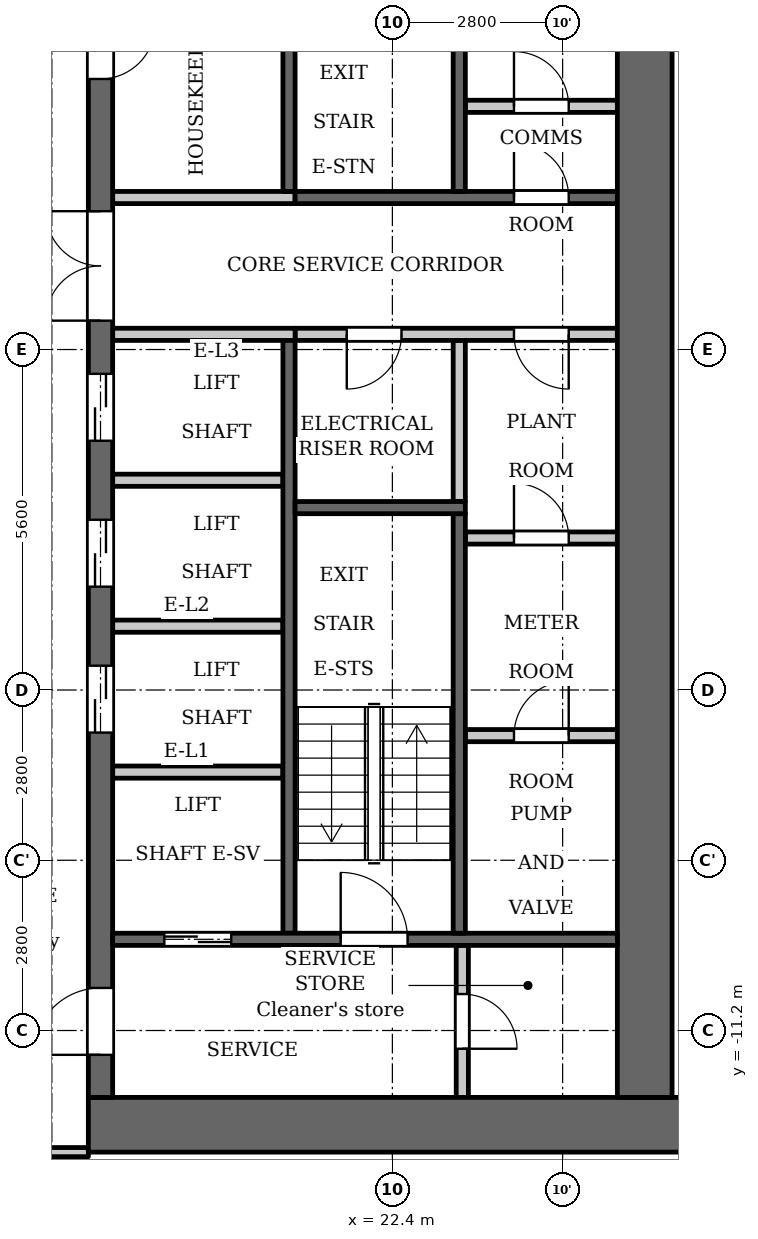
"""IFC4 building model, lengths in metres.
Left out: names, types, materials, properties, quantities, classifications, styles, units other than length and angle.
Written with IfcOpenShell. Run it as: python <this file> out.ifc"""

import sys

from ifc_helpers import new_model, si_unit, direction, frame, frame_2d, origin, place, context, subcontext, project, spatial, rectangle, extrude, element, fill, save


model = new_model("IFC4")
c1 = context("Model", 3, precision=1e-05, world=origin(), true_north=direction((0.0, 1.0)))
c2 = subcontext(c1, "Body", "Model", "MODEL_VIEW")
j1 = project(units=[si_unit("LENGTHUNIT", "METRE"), si_unit("PLANEANGLEUNIT", "RADIAN")], contexts=[c1])
p1 = place(None, origin())
s1 = spatial("IfcSite", under=j1, at=p1, CompositionType="ELEMENT")
p2 = place(p1, origin())
s2 = spatial("IfcBuilding", under=s1, at=p2, CompositionType="ELEMENT")
p3 = place(p2, frame((0.0, 0.0, 111.3)))
s3 = spatial("IfcBuildingStorey", under=s2, at=p3, CompositionType="ELEMENT", Elevation=111.3)
p4 = place(p3, frame((23.5, -2.5, 0.0), z_axis=(0.0, 0.0, 1.0), x_axis=(0.0, 1.0, 0.0)))
e1 = element("IfcWall", 1, at=p4, inside=s3, PredefinedType="PARTITIONING", context=c2, shape_type="SweptSolid", body=[
    extrude(rectangle(XDim=2.65, YDim=0.2, at=frame_2d((1.325, 0.0))), origin(), (0.0, 0.0, 1.0), 3.2),
])
p5 = place(p3, frame((20.7, 2.6, 0.0), z_axis=(0.0, 0.0, 1.0), x_axis=(0.0, 1.0, 0.0)))
e2 = element("IfcWall", 2, at=p5, inside=s3, PredefinedType="SHEAR", context=c2, shape_type="SweptSolid", body=[
    extrude(rectangle(XDim=7.0, YDim=0.2, at=frame_2d((3.5, 0.0))), origin(), (0.0, 0.0, 1.0), 3.2),
])
p6 = place(p3, frame((20.7, -9.6, 0.0), z_axis=(0.0, 0.0, 1.0), x_axis=(0.0, 1.0, 0.0)))
e3 = element("IfcWall", 3, at=p6, inside=s3, PredefinedType="SHEAR", context=c2, shape_type="SweptSolid", body=[
    extrude(rectangle(XDim=9.75, YDim=0.2, at=frame_2d((4.875, 0.0))), origin(), (0.0, 0.0, 1.0), 3.2),
])
p7 = place(p3, frame((20.8, 2.5, 0.0), z_axis=(0.0, 0.0, 1.0), x_axis=(1.0, 0.0, 0.0)))
e4 = element("IfcWall", 4, at=p7, inside=s3, PredefinedType="SHEAR", context=c2, shape_type="SweptSolid", body=[
    extrude(rectangle(XDim=5.3, YDim=0.2, at=frame_2d((2.65, 0.0))), origin(), (0.0, 0.0, 1.0), 3.2),
])
p8 = place(p7, frame((3.6, 0.0, 0.0)))
e5 = element("IfcOpeningElement", 5, at=p8, cuts=e4, PredefinedType="OPENING", context=c2, shape_type="SweptSolid", body=[
    extrude(rectangle(XDim=0.9, YDim=2.1, at=frame_2d((0.45, 1.05))), frame((0.0, 0.11, 0.0), z_axis=(0.0, -1.0, 0.0), x_axis=(1.0, 0.0, 0.0)), (0.0, 0.0, 1.0), 0.22),
])
p9 = place(p3, frame((20.8, 0.25, 0.0), z_axis=(0.0, 0.0, 1.0), x_axis=(1.0, 0.0, 0.0)))
e6 = element("IfcWall", 6, at=p9, inside=s3, PredefinedType="PARTITIONING", context=c2, shape_type="SweptSolid", body=[
    extrude(rectangle(XDim=5.3, YDim=0.2, at=frame_2d((2.65, 0.0))), origin(), (0.0, 0.0, 1.0), 3.2),
])
p10 = place(p9, frame((0.85, 0.0, 0.0)))
e7 = element("IfcOpeningElement", 7, at=p10, cuts=e6, PredefinedType="OPENING", context=c2, shape_type="SweptSolid", body=[
    extrude(rectangle(XDim=0.9, YDim=2.1, at=frame_2d((0.45, 1.05))), frame((0.0, 0.11, 0.0), z_axis=(0.0, -1.0, 0.0), x_axis=(1.0, 0.0, 0.0)), (0.0, 0.0, 1.0), 0.22),
])
p11 = place(p9, frame((3.6, 0.0, 0.0)))
e8 = element("IfcOpeningElement", 8, at=p11, cuts=e6, PredefinedType="OPENING", context=c2, shape_type="SweptSolid", body=[
    extrude(rectangle(XDim=0.9, YDim=2.1, at=frame_2d((0.45, 1.05))), frame((0.0, 0.11, 0.0), z_axis=(0.0, -1.0, 0.0), x_axis=(1.0, 0.0, 0.0)), (0.0, 0.0, 1.0), 0.22),
])
p12 = place(p3, frame((17.4, -12.75, 0.0), z_axis=(0.0, 0.0, 1.0), x_axis=(1.0, 0.0, 0.0)))
e9 = element("IfcWall", 9, at=p12, inside=s3, PredefinedType="SHEAR", context=c2, shape_type="SweptSolid", body=[
    extrude(rectangle(XDim=10.4, YDim=0.9, at=frame_2d((5.2, 0.0))), origin(), (0.0, 0.0, 1.0), 3.2),
])
p13 = place(p3, frame((17.6, -12.3, 0.0), z_axis=(0.0, 0.0, 1.0), x_axis=(0.0, 1.0, 0.0)))
e10 = element("IfcWall", 10, at=p13, inside=s3, PredefinedType="SHEAR", context=c2, shape_type="SweptSolid", body=[
    extrude(rectangle(XDim=24.6, YDim=0.4, at=frame_2d((12.3, 0.0))), origin(), (0.0, 0.0, 1.0), 3.2),
])
p14 = place(p13, frame((6.0, 0.0, 0.0)))
e11 = element("IfcOpeningElement", 11, at=p14, cuts=e10, PredefinedType="OPENING", context=c2, shape_type="SweptSolid", body=[
    extrude(rectangle(XDim=1.1, YDim=2.1, at=frame_2d((0.55, 1.05))), frame((0.0, 0.21, 0.0), z_axis=(0.0, -1.0, 0.0), x_axis=(1.0, 0.0, 0.0)), (0.0, 0.0, 1.0), 0.42),
])
p15 = place(p13, frame((8.4, 0.0, 0.0)))
e12 = element("IfcOpeningElement", 12, at=p15, cuts=e10, PredefinedType="OPENING", context=c2, shape_type="SweptSolid", body=[
    extrude(rectangle(XDim=1.1, YDim=2.1, at=frame_2d((0.55, 1.05))), frame((0.0, 0.21, 0.0), z_axis=(0.0, -1.0, 0.0), x_axis=(1.0, 0.0, 0.0)), (0.0, 0.0, 1.0), 0.42),
])
p16 = place(p13, frame((10.8, 0.0, 0.0)))
e13 = element("IfcOpeningElement", 13, at=p16, cuts=e10, PredefinedType="OPENING", context=c2, shape_type="SweptSolid", body=[
    extrude(rectangle(XDim=1.1, YDim=2.1, at=frame_2d((0.55, 1.05))), frame((0.0, 0.21, 0.0), z_axis=(0.0, -1.0, 0.0), x_axis=(1.0, 0.0, 0.0)), (0.0, 0.0, 1.0), 0.42),
])
p17 = place(p13, frame((16.75, 0.0, 0.0)))
e14 = element("IfcOpeningElement", 14, at=p17, cuts=e10, PredefinedType="OPENING", context=c2, shape_type="SweptSolid", body=[
    extrude(rectangle(XDim=0.9, YDim=2.1, at=frame_2d((0.45, 1.05))), frame((0.0, 0.21, 0.0), z_axis=(0.0, -1.0, 0.0), x_axis=(1.0, 0.0, 0.0)), (0.0, 0.0, 1.0), 0.42),
])
p18 = place(p13, frame((22.8, 0.0, 0.0)))
e15 = element("IfcOpeningElement", 15, at=p18, cuts=e10, PredefinedType="OPENING", context=c2, shape_type="SweptSolid", body=[
    extrude(rectangle(XDim=1.1, YDim=2.1, at=frame_2d((0.55, 1.05))), frame((0.0, 0.21, 0.0), z_axis=(0.0, -1.0, 0.0), x_axis=(1.0, 0.0, 0.0)), (0.0, 0.0, 1.0), 0.42),
])
p19 = place(p13, frame((0.7, 0.0, 0.0)))
e16 = element("IfcOpeningElement", 16, at=p19, cuts=e10, PredefinedType="OPENING", context=c2, shape_type="SweptSolid", body=[
    extrude(rectangle(XDim=1.1, YDim=2.1, at=frame_2d((0.55, 1.05))), frame((0.0, 0.21, 0.0), z_axis=(0.0, -1.0, 0.0), x_axis=(1.0, 0.0, 0.0)), (0.0, 0.0, 1.0), 0.42),
])
p20 = place(p13, frame((12.775, 0.0, 0.0)))
e17 = element("IfcOpeningElement", 17, at=p20, cuts=e10, PredefinedType="OPENING", context=c2, shape_type="SweptSolid", body=[
    extrude(rectangle(XDim=1.8, YDim=2.1, at=frame_2d((0.9, 1.05))), frame((0.0, 0.21, 0.0), z_axis=(0.0, -1.0, 0.0), x_axis=(1.0, 0.0, 0.0)), (0.0, 0.0, 1.0), 0.42),
])
p21 = place(p3, frame((26.55, -12.3, 0.0), z_axis=(0.0, 0.0, 1.0), x_axis=(0.0, 1.0, 0.0)))
e18 = element("IfcWall", 18, at=p21, inside=s3, PredefinedType="SHEAR", context=c2, shape_type="SweptSolid", body=[
    extrude(rectangle(XDim=24.6, YDim=0.9, at=frame_2d((12.3, 0.0))), origin(), (0.0, 0.0, 1.0), 3.2),
])
p22 = place(p3, frame((23.55, -12.3, 0.0), z_axis=(0.0, 0.0, 1.0), x_axis=(0.0, 1.0, 0.0)))
e19 = element("IfcWall", 19, at=p22, inside=s3, PredefinedType="PARTITIONING", context=c2, shape_type="SweptSolid", body=[
    extrude(rectangle(XDim=2.5, YDim=0.2, at=frame_2d((1.25, 0.0))), origin(), (0.0, 0.0, 1.0), 3.2),
])
p23 = place(p22, frame((0.8, 0.0, 0.0)))
e20 = element("IfcOpeningElement", 20, at=p23, cuts=e19, PredefinedType="OPENING", context=c2, shape_type="SweptSolid", body=[
    extrude(rectangle(XDim=0.9, YDim=2.1, at=frame_2d((0.45, 1.05))), frame((0.0, 0.11, 0.0), z_axis=(0.0, -1.0, 0.0), x_axis=(1.0, 0.0, 0.0)), (0.0, 0.0, 1.0), 0.22),
])
p24 = place(p3, frame((23.6, -6.35, 0.0), z_axis=(0.0, 0.0, 1.0), x_axis=(1.0, 0.0, 0.0)))
e21 = element("IfcWall", 21, at=p24, inside=s3, PredefinedType="PARTITIONING", context=c2, shape_type="SweptSolid", body=[
    extrude(rectangle(XDim=2.5, YDim=0.2, at=frame_2d((1.25, 0.0))), origin(), (0.0, 0.0, 1.0), 3.2),
])
p25 = place(p24, frame((0.8, 0.0, 0.0)))
e22 = element("IfcOpeningElement", 22, at=p25, cuts=e21, PredefinedType="OPENING", context=c2, shape_type="SweptSolid", body=[
    extrude(rectangle(XDim=0.9, YDim=2.1, at=frame_2d((0.45, 1.05))), frame((0.0, 0.11, 0.0), z_axis=(0.0, -1.0, 0.0), x_axis=(1.0, 0.0, 0.0)), (0.0, 0.0, 1.0), 0.22),
])
p26 = place(p3, frame((23.6, -3.1, 0.0), z_axis=(0.0, 0.0, 1.0), x_axis=(1.0, 0.0, 0.0)))
e23 = element("IfcWall", 23, at=p26, inside=s3, PredefinedType="PARTITIONING", context=c2, shape_type="SweptSolid", body=[
    extrude(rectangle(XDim=2.5, YDim=0.2, at=frame_2d((1.25, 0.0))), origin(), (0.0, 0.0, 1.0), 3.2),
])
p27 = place(p26, frame((0.8, 0.0, 0.0)))
e24 = element("IfcOpeningElement", 24, at=p27, cuts=e23, PredefinedType="OPENING", context=c2, shape_type="SweptSolid", body=[
    extrude(rectangle(XDim=0.9, YDim=2.1, at=frame_2d((0.45, 1.05))), frame((0.0, 0.11, 0.0), z_axis=(0.0, -1.0, 0.0), x_axis=(1.0, 0.0, 0.0)), (0.0, 0.0, 1.0), 0.22),
])
p28 = place(p3, frame((23.6, 4.0, 0.0), z_axis=(0.0, 0.0, 1.0), x_axis=(1.0, 0.0, 0.0)))
e25 = element("IfcWall", 25, at=p28, inside=s3, PredefinedType="PARTITIONING", context=c2, shape_type="SweptSolid", body=[
    extrude(rectangle(XDim=2.5, YDim=0.2, at=frame_2d((1.25, 0.0))), origin(), (0.0, 0.0, 1.0), 3.2),
])
p29 = place(p28, frame((0.8, 0.0, 0.0)))
e26 = element("IfcOpeningElement", 26, at=p29, cuts=e25, PredefinedType="OPENING", context=c2, shape_type="SweptSolid", body=[
    extrude(rectangle(XDim=0.9, YDim=2.1, at=frame_2d((0.45, 1.05))), frame((0.0, 0.11, 0.0), z_axis=(0.0, -1.0, 0.0), x_axis=(1.0, 0.0, 0.0)), (0.0, 0.0, 1.0), 0.22),
])
p30 = place(p3, frame((17.8, -9.7, 0.0), z_axis=(0.0, 0.0, 1.0), x_axis=(1.0, 0.0, 0.0)))
e27 = element("IfcWall", 27, at=p30, inside=s3, PredefinedType="SHEAR", context=c2, shape_type="SweptSolid", body=[
    extrude(rectangle(XDim=8.3, YDim=0.2, at=frame_2d((4.15, 0.0))), origin(), (0.0, 0.0, 1.0), 3.2),
])
p31 = place(p30, frame((0.85, 0.0, 0.0)))
e28 = element("IfcOpeningElement", 28, at=p31, cuts=e27, PredefinedType="OPENING", context=c2, shape_type="SweptSolid", body=[
    extrude(rectangle(XDim=1.1, YDim=2.1, at=frame_2d((0.55, 1.05))), frame((0.0, 0.11, 0.0), z_axis=(0.0, -1.0, 0.0), x_axis=(1.0, 0.0, 0.0)), (0.0, 0.0, 1.0), 0.22),
])
p32 = place(p30, frame((3.75, 0.0, 0.0)))
e29 = element("IfcOpeningElement", 29, at=p32, cuts=e27, PredefinedType="OPENING", context=c2, shape_type="SweptSolid", body=[
    extrude(rectangle(XDim=1.1, YDim=2.1, at=frame_2d((0.55, 1.05))), frame((0.0, 0.11, 0.0), z_axis=(0.0, -1.0, 0.0), x_axis=(1.0, 0.0, 0.0)), (0.0, 0.0, 1.0), 0.22),
])
for number, where, z_axis, x_axis in (
    (30, (17.8, -6.95, 0.0), (0.0, 0.0, 1.0), (1.0, 0.0, 0.0)),
    (31, (17.8, -4.55, 0.0), (0.0, 0.0, 1.0), (1.0, 0.0, 0.0)),
    (32, (17.8, -2.15, 0.0), (0.0, 0.0, 1.0), (1.0, 0.0, 0.0)),
):
    element("IfcWall", number, at=place(p3, frame(where, z_axis=z_axis, x_axis=x_axis)), inside=s3, PredefinedType="PARTITIONING", context=c2, shape_type="SweptSolid", body=[
        extrude(rectangle(XDim=2.8, YDim=0.2, at=frame_2d((1.4, 0.0))), origin(), (0.0, 0.0, 1.0), 3.2),
    ])
for number, where, z_axis, x_axis in (
    (33, (17.8, 0.25, 0.0), (0.0, 0.0, 1.0), (1.0, 0.0, 0.0)),
    (34, (17.8, 2.5, 0.0), (0.0, 0.0, 1.0), (1.0, 0.0, 0.0)),
):
    element("IfcWall", number, at=place(p3, frame(where, z_axis=z_axis, x_axis=x_axis)), inside=s3, PredefinedType="PARTITIONING", context=c2, shape_type="SweptSolid", body=[
        extrude(rectangle(XDim=3.0, YDim=0.2, at=frame_2d((1.5, 0.0))), origin(), (0.0, 0.0, 1.0), 3.2),
    ])
p33 = place(p3, frame((23.5, 2.6, 0.0), z_axis=(0.0, 0.0, 1.0), x_axis=(0.0, 1.0, 0.0)))
e35 = element("IfcWall", 35, at=p33, inside=s3, PredefinedType="SHEAR", context=c2, shape_type="SweptSolid", body=[
    extrude(rectangle(XDim=7.0, YDim=0.2, at=frame_2d((3.5, 0.0))), origin(), (0.0, 0.0, 1.0), 3.2),
])
p34 = place(p3, frame((23.5, -9.6, 0.0), z_axis=(0.0, 0.0, 1.0), x_axis=(0.0, 1.0, 0.0)))
e36 = element("IfcWall", 36, at=p34, inside=s3, PredefinedType="SHEAR", context=c2, shape_type="SweptSolid", body=[
    extrude(rectangle(XDim=6.9, YDim=0.2, at=frame_2d((3.45, 0.0))), origin(), (0.0, 0.0, 1.0), 3.2),
])
p35 = place(p3, frame((20.8, -2.6, 0.0), z_axis=(0.0, 0.0, 1.0), x_axis=(1.0, 0.0, 0.0)))
e37 = element("IfcWall", 37, at=p35, inside=s3, PredefinedType="SHEAR", context=c2, shape_type="SweptSolid", body=[
    extrude(rectangle(XDim=2.8, YDim=0.2, at=frame_2d((1.4, 0.0))), origin(), (0.0, 0.0, 1.0), 3.2),
])
p36 = place(p3, frame((-17.4, -13.2, 0.0), z_axis=(0.0, 0.0, 1.0), x_axis=(1.0, 0.0, 0.0)))
e38 = element("IfcWall", 38, at=p36, inside=s3, PredefinedType="PARTITIONING", context=c2, shape_type="SweptSolid", body=[
    extrude(rectangle(XDim=34.8, YDim=0.15, at=frame_2d((17.4, 0.0))), origin(), (0.0, 0.0, 1.0), 3.2),
])
p37 = place(p36, frame((0.65, 0.0, 0.0)))
e39 = element("IfcOpeningElement", 39, at=p37, cuts=e38, PredefinedType="OPENING", context=c2, shape_type="SweptSolid", body=[
    extrude(rectangle(XDim=1.0, YDim=2.1, at=frame_2d((0.5, 1.05))), frame((0.0, 0.085, 0.0), z_axis=(0.0, -1.0, 0.0), x_axis=(1.0, 0.0, 0.0)), (0.0, 0.0, 1.0), 0.17),
])
p38 = place(p36, frame((33.05, 0.0, 0.0)))
e40 = element("IfcOpeningElement", 40, at=p38, cuts=e38, PredefinedType="OPENING", context=c2, shape_type="SweptSolid", body=[
    extrude(rectangle(XDim=1.0, YDim=2.1, at=frame_2d((0.5, 1.05))), frame((0.0, 0.085, 0.0), z_axis=(0.0, -1.0, 0.0), x_axis=(1.0, 0.0, 0.0)), (0.0, 0.0, 1.0), 0.17),
])
p39 = place(p36, frame((4.55, 0.0, 0.0)))
e41 = element("IfcOpeningElement", 41, at=p39, cuts=e38, PredefinedType="OPENING", context=c2, shape_type="SweptSolid", body=[
    extrude(rectangle(XDim=1.0, YDim=2.1, at=frame_2d((0.5, 1.05))), frame((0.0, 0.085, 0.0), z_axis=(0.0, -1.0, 0.0), x_axis=(1.0, 0.0, 0.0)), (0.0, 0.0, 1.0), 0.17),
])
p40 = place(p36, frame((6.9, 0.0, 0.0)))
e42 = element("IfcOpeningElement", 42, at=p40, cuts=e38, PredefinedType="OPENING", context=c2, shape_type="SweptSolid", body=[
    extrude(rectangle(XDim=1.0, YDim=2.1, at=frame_2d((0.5, 1.05))), frame((0.0, 0.085, 0.0), z_axis=(0.0, -1.0, 0.0), x_axis=(1.0, 0.0, 0.0)), (0.0, 0.0, 1.0), 0.17),
])
p41 = place(p36, frame((15.75, 0.0, 0.0)))
e43 = element("IfcOpeningElement", 43, at=p41, cuts=e38, PredefinedType="OPENING", context=c2, shape_type="SweptSolid", body=[
    extrude(rectangle(XDim=1.0, YDim=2.1, at=frame_2d((0.5, 1.05))), frame((0.0, 0.085, 0.0), z_axis=(0.0, -1.0, 0.0), x_axis=(1.0, 0.0, 0.0)), (0.0, 0.0, 1.0), 0.17),
])
p42 = place(p36, frame((18.1, 0.0, 0.0)))
e44 = element("IfcOpeningElement", 44, at=p42, cuts=e38, PredefinedType="OPENING", context=c2, shape_type="SweptSolid", body=[
    extrude(rectangle(XDim=1.0, YDim=2.1, at=frame_2d((0.5, 1.05))), frame((0.0, 0.085, 0.0), z_axis=(0.0, -1.0, 0.0), x_axis=(1.0, 0.0, 0.0)), (0.0, 0.0, 1.0), 0.17),
])
p43 = place(p36, frame((26.95, 0.0, 0.0)))
e45 = element("IfcOpeningElement", 45, at=p43, cuts=e38, PredefinedType="OPENING", context=c2, shape_type="SweptSolid", body=[
    extrude(rectangle(XDim=1.0, YDim=2.1, at=frame_2d((0.5, 1.05))), frame((0.0, 0.085, 0.0), z_axis=(0.0, -1.0, 0.0), x_axis=(1.0, 0.0, 0.0)), (0.0, 0.0, 1.0), 0.17),
])
p44 = place(p36, frame((29.25, 0.0, 0.0)))
e46 = element("IfcOpeningElement", 46, at=p44, cuts=e38, PredefinedType="OPENING", context=c2, shape_type="SweptSolid", body=[
    extrude(rectangle(XDim=1.0, YDim=2.1, at=frame_2d((0.5, 1.05))), frame((0.0, 0.085, 0.0), z_axis=(0.0, -1.0, 0.0), x_axis=(1.0, 0.0, 0.0)), (0.0, 0.0, 1.0), 0.17),
])
p45 = place(p31, origin())
e47 = element("IfcDoor", 47, at=p45, inside=s3, OperationType="DOUBLE_DOOR_SLIDING", PredefinedType="DOOR", context=c2, shape_type="SweptSolid", body=[
    extrude(rectangle(XDim=1.1, YDim=2.1, at=frame_2d((0.55, 1.05))), frame((0.0, 0.025, 0.0), z_axis=(0.0, -1.0, 0.0), x_axis=(1.0, 0.0, 0.0)), (0.0, 0.0, 1.0), 0.05),
])
fill(e28, e47)
p46 = place(p14, origin())
e48 = element("IfcDoor", 48, at=p46, inside=s3, OperationType="DOUBLE_DOOR_SLIDING", PredefinedType="DOOR", context=c2, shape_type="SweptSolid", body=[
    extrude(rectangle(XDim=1.1, YDim=2.1, at=frame_2d((0.55, 1.05))), frame((0.0, 0.025, 0.0), z_axis=(0.0, -1.0, 0.0), x_axis=(1.0, 0.0, 0.0)), (0.0, 0.0, 1.0), 0.05),
])
fill(e11, e48)
p47 = place(p15, origin())
e49 = element("IfcDoor", 49, at=p47, inside=s3, OperationType="DOUBLE_DOOR_SLIDING", PredefinedType="DOOR", context=c2, shape_type="SweptSolid", body=[
    extrude(rectangle(XDim=1.1, YDim=2.1, at=frame_2d((0.55, 1.05))), frame((0.0, 0.025, 0.0), z_axis=(0.0, -1.0, 0.0), x_axis=(1.0, 0.0, 0.0)), (0.0, 0.0, 1.0), 0.05),
])
fill(e12, e49)
p48 = place(p16, origin())
e50 = element("IfcDoor", 50, at=p48, inside=s3, OperationType="DOUBLE_DOOR_SLIDING", PredefinedType="DOOR", context=c2, shape_type="SweptSolid", body=[
    extrude(rectangle(XDim=1.1, YDim=2.1, at=frame_2d((0.55, 1.05))), frame((0.0, 0.025, 0.0), z_axis=(0.0, -1.0, 0.0), x_axis=(1.0, 0.0, 0.0)), (0.0, 0.0, 1.0), 0.05),
])
fill(e13, e50)
p49 = place(p17, origin())
e51 = element("IfcDoor", 51, at=p49, inside=s3, OperationType="SINGLE_SWING_RIGHT", PredefinedType="DOOR", context=c2, shape_type="SweptSolid", body=[
    extrude(rectangle(XDim=0.9, YDim=2.1, at=frame_2d((0.45, 1.05))), frame((0.0, 0.025, 0.0), z_axis=(0.0, -1.0, 0.0), x_axis=(1.0, 0.0, 0.0)), (0.0, 0.0, 1.0), 0.05),
])
fill(e14, e51)
p50 = place(p19, origin())
e52 = element("IfcDoor", 52, at=p50, inside=s3, OperationType="SINGLE_SWING_RIGHT", PredefinedType="DOOR", context=c2, shape_type="SweptSolid", body=[
    extrude(rectangle(XDim=1.1, YDim=2.1, at=frame_2d((0.55, 1.05))), frame((0.0, 0.025, 0.0), z_axis=(0.0, -1.0, 0.0), x_axis=(1.0, 0.0, 0.0)), (0.0, 0.0, 1.0), 0.05),
])
fill(e16, e52)
p51 = place(p23, origin())
e53 = element("IfcDoor", 53, at=p51, inside=s3, OperationType="SINGLE_SWING_LEFT", PredefinedType="DOOR", context=c2, shape_type="SweptSolid", body=[
    extrude(rectangle(XDim=0.9, YDim=2.1, at=frame_2d((0.45, 1.05))), frame((0.0, 0.025, 0.0), z_axis=(0.0, -1.0, 0.0), x_axis=(1.0, 0.0, 0.0)), (0.0, 0.0, 1.0), 0.05),
])
fill(e20, e53)
p52 = place(p32, origin())
e54 = element("IfcDoor", 54, at=p52, inside=s3, OperationType="SINGLE_SWING_RIGHT", PredefinedType="DOOR", context=c2, shape_type="SweptSolid", body=[
    extrude(rectangle(XDim=1.1, YDim=2.1, at=frame_2d((0.55, 1.05))), frame((0.0, 0.025, 0.0), z_axis=(0.0, -1.0, 0.0), x_axis=(1.0, 0.0, 0.0)), (0.0, 0.0, 1.0), 0.05),
])
fill(e29, e54)
p53 = place(p20, origin())
e55 = element("IfcDoor", 55, at=p53, inside=s3, OperationType="DOUBLE_DOOR_SINGLE_SWING", PredefinedType="DOOR", context=c2, shape_type="SweptSolid", body=[
    extrude(rectangle(XDim=1.8, YDim=2.1, at=frame_2d((0.9, 1.05))), frame((0.0, 0.025, 0.0), z_axis=(0.0, -1.0, 0.0), x_axis=(1.0, 0.0, 0.0)), (0.0, 0.0, 1.0), 0.05),
])
fill(e17, e55)
p54 = place(p10, origin())
e56 = element("IfcDoor", 56, at=p54, inside=s3, OperationType="SINGLE_SWING_LEFT", PredefinedType="DOOR", context=c2, shape_type="SweptSolid", body=[
    extrude(rectangle(XDim=0.9, YDim=2.1, at=frame_2d((0.45, 1.05))), frame((0.0, 0.025, 0.0), z_axis=(0.0, -1.0, 0.0), x_axis=(1.0, 0.0, 0.0)), (0.0, 0.0, 1.0), 0.05),
])
fill(e7, e56)
p55 = place(p25, origin())
e57 = element("IfcDoor", 57, at=p55, inside=s3, OperationType="SINGLE_SWING_LEFT", PredefinedType="DOOR", context=c2, shape_type="SweptSolid", body=[
    extrude(rectangle(XDim=0.9, YDim=2.1, at=frame_2d((0.45, 1.05))), frame((0.0, 0.025, 0.0), z_axis=(0.0, -1.0, 0.0), x_axis=(1.0, 0.0, 0.0)), (0.0, 0.0, 1.0), 0.05),
])
fill(e22, e57)
p56 = place(p27, origin())
e58 = element("IfcDoor", 58, at=p56, inside=s3, OperationType="SINGLE_SWING_RIGHT", PredefinedType="DOOR", context=c2, shape_type="SweptSolid", body=[
    extrude(rectangle(XDim=0.9, YDim=2.1, at=frame_2d((0.45, 1.05))), frame((0.0, 0.025, 0.0), z_axis=(0.0, -1.0, 0.0), x_axis=(1.0, 0.0, 0.0)), (0.0, 0.0, 1.0), 0.05),
])
fill(e24, e58)
p57 = place(p11, origin())
e59 = element("IfcDoor", 59, at=p57, inside=s3, OperationType="SINGLE_SWING_RIGHT", PredefinedType="DOOR", context=c2, shape_type="SweptSolid", body=[
    extrude(rectangle(XDim=0.9, YDim=2.1, at=frame_2d((0.45, 1.05))), frame((0.0, 0.025, 0.0), z_axis=(0.0, -1.0, 0.0), x_axis=(1.0, 0.0, 0.0)), (0.0, 0.0, 1.0), 0.05),
])
fill(e8, e59)
p58 = place(p29, origin())
e60 = element("IfcDoor", 60, at=p58, inside=s3, OperationType="SINGLE_SWING_RIGHT", PredefinedType="DOOR", context=c2, shape_type="SweptSolid", body=[
    extrude(rectangle(XDim=0.9, YDim=2.1, at=frame_2d((0.45, 1.05))), frame((0.0, 0.025, 0.0), z_axis=(0.0, -1.0, 0.0), x_axis=(1.0, 0.0, 0.0)), (0.0, 0.0, 1.0), 0.05),
])
fill(e26, e60)
p59 = place(p8, origin())
e61 = element("IfcDoor", 61, at=p59, inside=s3, OperationType="SINGLE_SWING_RIGHT", PredefinedType="DOOR", context=c2, shape_type="SweptSolid", body=[
    extrude(rectangle(XDim=0.9, YDim=2.1, at=frame_2d((0.45, 1.05))), frame((0.0, 0.025, 0.0), z_axis=(0.0, -1.0, 0.0), x_axis=(1.0, 0.0, 0.0)), (0.0, 0.0, 1.0), 0.05),
])
fill(e5, e61)
save(model, sys.argv[1])
